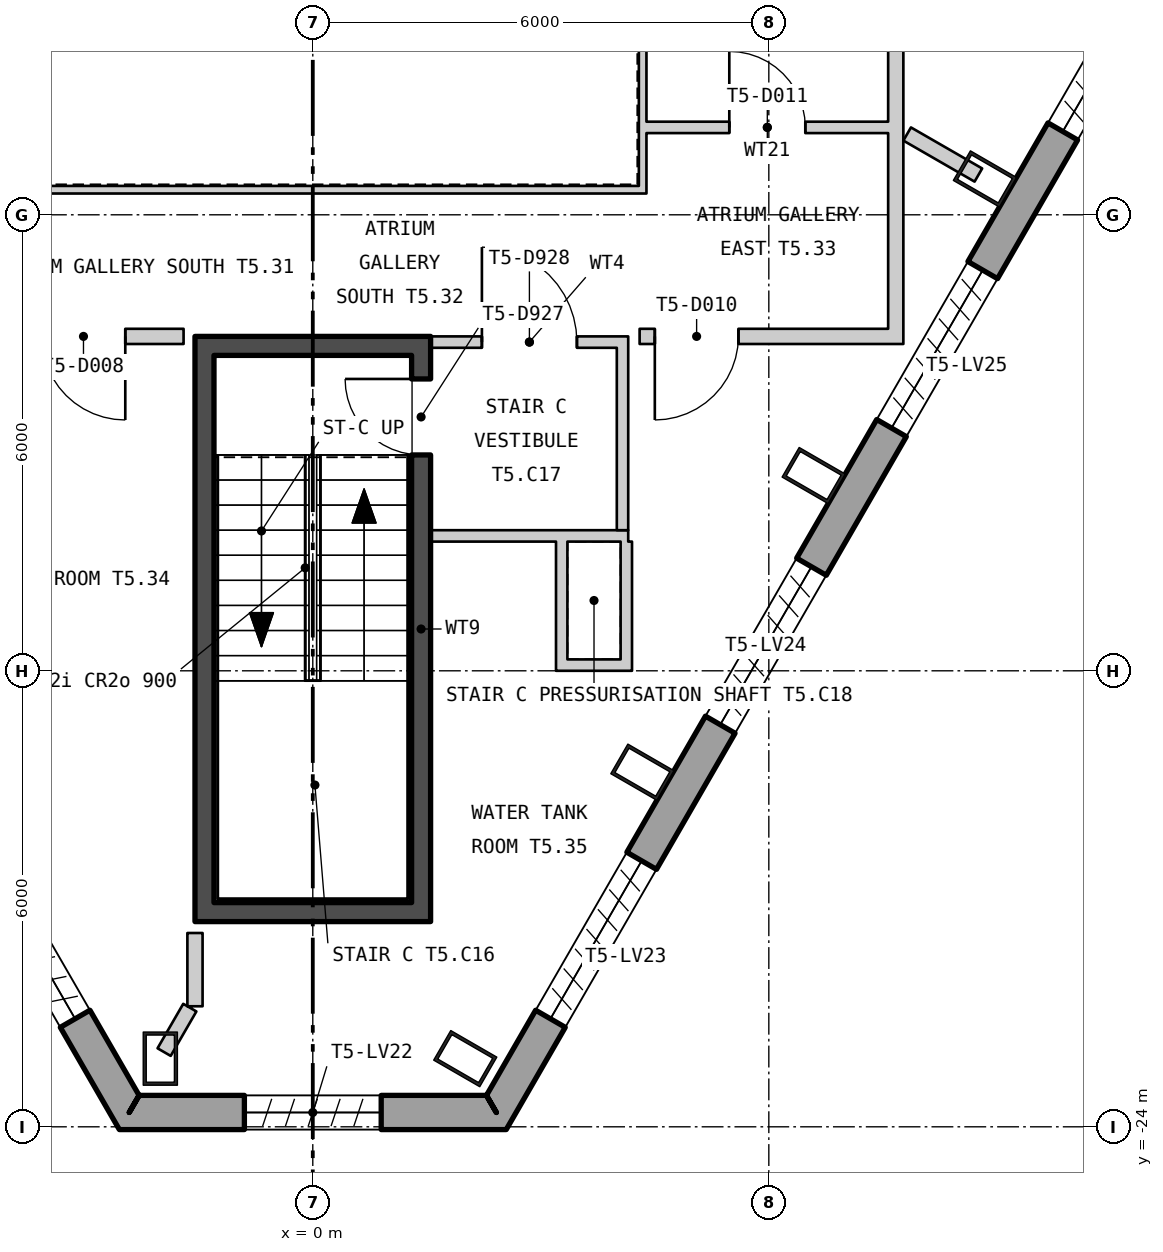
"""IFC4 building model, lengths in metres.
Left out: names, types, materials, properties, quantities, classifications, styles, units other than length and angle.
Written with IfcOpenShell. Run it as: python <this file> out.ifc"""

import sys

from ifc_helpers import new_model, si_unit, direction, frame, frame_2d, origin, origin_2d, place, context, subcontext, project, spatial, polyline, rectangle, hollow_rectangle, outline, extrude, element, fill, save


model = new_model("IFC4")
c1 = context("Model", 3, precision=1e-05, world=origin(), true_north=direction((0.0, 1.0)))
c2 = subcontext(c1, "Body", "Model", "MODEL_VIEW")
j1 = project(units=[si_unit("LENGTHUNIT", "METRE"), si_unit("PLANEANGLEUNIT", "RADIAN")], contexts=[c1])
p1 = place(None, origin())
s1 = spatial("IfcSite", under=j1, at=p1, CompositionType="ELEMENT")
p2 = place(p1, origin())
s2 = spatial("IfcBuilding", under=s1, at=p2, CompositionType="ELEMENT")
p3 = place(p2, frame((0.0, 0.0, 292.2)))
s3 = spatial("IfcBuildingStorey", under=s2, at=p3, CompositionType="ELEMENT", Elevation=292.2)
for number, where, z_axis, x_axis in (
    (1, (-2.006, -23.103, 0.0), (0.0, 0.0, 1.0), (1.0, 0.0, 0.0)),
    (2, (2.006, -23.103, 0.0), (0.0, 0.0, 1.0), (0.5, 0.866, 0.0)),
    (3, (4.336, -19.334, 0.0), (0.0, 0.0, 1.0), (0.5, 0.866, 0.0)),
    (4, (6.59, -15.431, 0.0), (0.0, 0.0, 1.0), (0.5, 0.866, 0.0)),
    (5, (8.843, -11.528, 0.0), (0.0, 0.0, 1.0), (0.5, 0.866, 0.0)),
):
    element("IfcColumn", number, at=place(p3, frame(where, z_axis=z_axis, x_axis=x_axis)), inside=s3, PredefinedType="COLUMN", context=c2, shape_type="SweptSolid", body=[
        extrude(hollow_rectangle(XDim=0.45, YDim=0.7, WallThickness=0.04, at=origin_2d()), origin(), (0.0, 0.0, 1.0), 6.0),
    ])
p4 = place(p3, frame((-25.28, 15.792, -0.18), z_axis=(0.0, 0.0, 1.0), x_axis=(0.500000141277, -0.866025322218, 0.0)))
e6 = element("IfcWall", 6, at=p4, inside=s3, PredefinedType="SOLIDWALL", context=c2, shape_type="SweptSolid", body=[
    extrude(outline(polyline([(-0.13, -0.225), (45.86, -0.225), (45.6, 0.225), (0.13, 0.225), (-0.13, -0.225)])), origin(), (0.0, 0.0, 1.0), 5.9),
])
p5 = place(p4, frame((1.424, 0.0, 1.38)))
e7 = element("IfcOpeningElement", 7, at=p5, cuts=e6, PredefinedType="OPENING", context=c2, shape_type="SweptSolid", body=[
    extrude(rectangle(XDim=2.4, YDim=3.6, at=frame_2d((1.2, 1.8))), frame((0.0, 0.235, 0.0), z_axis=(0.0, -1.0, 0.0), x_axis=(1.0, 0.0, 0.0)), (0.0, 0.0, 1.0), 0.47),
])
p6 = place(p4, frame((5.892, 0.0, 1.38)))
e8 = element("IfcOpeningElement", 8, at=p6, cuts=e6, PredefinedType="OPENING", context=c2, shape_type="SweptSolid", body=[
    extrude(rectangle(XDim=2.4, YDim=3.6, at=frame_2d((1.2, 1.8))), frame((0.0, 0.235, 0.0), z_axis=(0.0, -1.0, 0.0), x_axis=(1.0, 0.0, 0.0)), (0.0, 0.0, 1.0), 0.47),
])
p7 = place(p4, frame((10.399, 0.0, 1.38)))
e9 = element("IfcOpeningElement", 9, at=p7, cuts=e6, PredefinedType="OPENING", context=c2, shape_type="SweptSolid", body=[
    extrude(rectangle(XDim=2.4, YDim=3.6, at=frame_2d((1.2, 1.8))), frame((0.0, 0.235, 0.0), z_axis=(0.0, -1.0, 0.0), x_axis=(1.0, 0.0, 0.0)), (0.0, 0.0, 1.0), 0.47),
])
p8 = place(p4, frame((14.905, 0.0, 1.38)))
e10 = element("IfcOpeningElement", 10, at=p8, cuts=e6, PredefinedType="OPENING", context=c2, shape_type="SweptSolid", body=[
    extrude(rectangle(XDim=2.4, YDim=3.6, at=frame_2d((1.2, 1.8))), frame((0.0, 0.235, 0.0), z_axis=(0.0, -1.0, 0.0), x_axis=(1.0, 0.0, 0.0)), (0.0, 0.0, 1.0), 0.47),
])
p9 = place(p4, frame((19.412, 0.0, 1.38)))
e11 = element("IfcOpeningElement", 11, at=p9, cuts=e6, PredefinedType="OPENING", context=c2, shape_type="SweptSolid", body=[
    extrude(rectangle(XDim=2.4, YDim=3.6, at=frame_2d((1.2, 1.8))), frame((0.0, 0.235, 0.0), z_axis=(0.0, -1.0, 0.0), x_axis=(1.0, 0.0, 0.0)), (0.0, 0.0, 1.0), 0.47),
])
p10 = place(p4, frame((23.918, 0.0, 1.38)))
e12 = element("IfcOpeningElement", 12, at=p10, cuts=e6, PredefinedType="OPENING", context=c2, shape_type="SweptSolid", body=[
    extrude(rectangle(XDim=2.4, YDim=3.6, at=frame_2d((1.2, 1.8))), frame((0.0, 0.235, 0.0), z_axis=(0.0, -1.0, 0.0), x_axis=(1.0, 0.0, 0.0)), (0.0, 0.0, 1.0), 0.47),
])
p11 = place(p4, frame((28.425, 0.0, 1.38)))
e13 = element("IfcOpeningElement", 13, at=p11, cuts=e6, PredefinedType="OPENING", context=c2, shape_type="SweptSolid", body=[
    extrude(rectangle(XDim=2.4, YDim=3.6, at=frame_2d((1.2, 1.8))), frame((0.0, 0.235, 0.0), z_axis=(0.0, -1.0, 0.0), x_axis=(1.0, 0.0, 0.0)), (0.0, 0.0, 1.0), 0.47),
])
p12 = place(p4, frame((32.932, 0.0, 1.38)))
e14 = element("IfcOpeningElement", 14, at=p12, cuts=e6, PredefinedType="OPENING", context=c2, shape_type="SweptSolid", body=[
    extrude(rectangle(XDim=2.4, YDim=3.6, at=frame_2d((1.2, 1.8))), frame((0.0, 0.235, 0.0), z_axis=(0.0, -1.0, 0.0), x_axis=(1.0, 0.0, 0.0)), (0.0, 0.0, 1.0), 0.47),
])
p13 = place(p4, frame((37.438, 0.0, 1.38)))
e15 = element("IfcOpeningElement", 15, at=p13, cuts=e6, PredefinedType="OPENING", context=c2, shape_type="SweptSolid", body=[
    extrude(rectangle(XDim=2.4, YDim=3.6, at=frame_2d((1.2, 1.8))), frame((0.0, 0.235, 0.0), z_axis=(0.0, -1.0, 0.0), x_axis=(1.0, 0.0, 0.0)), (0.0, 0.0, 1.0), 0.47),
])
p14 = place(p4, frame((41.907, 0.0, 1.38)))
e16 = element("IfcOpeningElement", 16, at=p14, cuts=e6, PredefinedType="OPENING", context=c2, shape_type="SweptSolid", body=[
    extrude(rectangle(XDim=2.4, YDim=3.6, at=frame_2d((1.2, 1.8))), frame((0.0, 0.235, 0.0), z_axis=(0.0, -1.0, 0.0), x_axis=(1.0, 0.0, 0.0)), (0.0, 0.0, 1.0), 0.47),
])
p15 = place(p3, frame((-2.415, -23.812, -0.18), z_axis=(0.0, 0.0, 1.0), x_axis=(1.0, 0.0, 0.0)))
e17 = element("IfcWall", 17, at=p15, inside=s3, PredefinedType="SOLIDWALL", context=c2, shape_type="SweptSolid", body=[
    extrude(outline(polyline([(-0.13, -0.225), (4.96, -0.225), (4.7, 0.225), (0.13, 0.225), (-0.13, -0.225)])), origin(), (0.0, 0.0, 1.0), 5.9),
])
p16 = place(p15, frame((1.515, 0.0, 1.38)))
e18 = element("IfcOpeningElement", 18, at=p16, cuts=e17, PredefinedType="OPENING", context=c2, shape_type="SweptSolid", body=[
    extrude(rectangle(XDim=1.8, YDim=3.6, at=frame_2d((0.9, 1.8))), frame((0.0, 0.235, 0.0), z_axis=(0.0, -1.0, 0.0), x_axis=(1.0, 0.0, 0.0)), (0.0, 0.0, 1.0), 0.47),
])
p17 = place(p3, frame((2.415, -23.812, -0.18), z_axis=(0.0, 0.0, 1.0), x_axis=(0.499998326906, 0.866026369744, 0.0)))
e19 = element("IfcWall", 19, at=p17, inside=s3, PredefinedType="SOLIDWALL", context=c2, shape_type="SweptSolid", body=[
    extrude(outline(polyline([(-0.13, -0.225), (17.959, -0.225), (17.959, 0.225), (0.13, 0.225), (-0.13, -0.225)])), origin(), (0.0, 0.0, 1.0), 5.9),
])
p18 = place(p17, frame((1.424, 0.0, 1.38)))
e20 = element("IfcOpeningElement", 20, at=p18, cuts=e19, PredefinedType="OPENING", context=c2, shape_type="SweptSolid", body=[
    extrude(rectangle(XDim=2.4, YDim=3.6, at=frame_2d((1.2, 1.8))), frame((0.0, 0.235, 0.0), z_axis=(0.0, -1.0, 0.0), x_axis=(1.0, 0.0, 0.0)), (0.0, 0.0, 1.0), 0.47),
])
p19 = place(p17, frame((5.892, 0.0, 1.38)))
e21 = element("IfcOpeningElement", 21, at=p19, cuts=e19, PredefinedType="OPENING", context=c2, shape_type="SweptSolid", body=[
    extrude(rectangle(XDim=2.4, YDim=3.6, at=frame_2d((1.2, 1.8))), frame((0.0, 0.235, 0.0), z_axis=(0.0, -1.0, 0.0), x_axis=(1.0, 0.0, 0.0)), (0.0, 0.0, 1.0), 0.47),
])
p20 = place(p17, frame((10.399, 0.0, 1.38)))
e22 = element("IfcOpeningElement", 22, at=p20, cuts=e19, PredefinedType="OPENING", context=c2, shape_type="SweptSolid", body=[
    extrude(rectangle(XDim=2.4, YDim=3.6, at=frame_2d((1.2, 1.8))), frame((0.0, 0.235, 0.0), z_axis=(0.0, -1.0, 0.0), x_axis=(1.0, 0.0, 0.0)), (0.0, 0.0, 1.0), 0.47),
])
p21 = place(p17, frame((14.905, 0.0, 1.38)))
e23 = element("IfcOpeningElement", 23, at=p21, cuts=e19, PredefinedType="OPENING", context=c2, shape_type="SweptSolid", body=[
    extrude(rectangle(XDim=2.4, YDim=3.6, at=frame_2d((1.2, 1.8))), frame((0.0, 0.235, 0.0), z_axis=(0.0, -1.0, 0.0), x_axis=(1.0, 0.0, 0.0)), (0.0, 0.0, 1.0), 0.47),
])
p22 = place(p3, frame((-4.39, -11.67, 0.0), z_axis=(0.0, 0.0, 1.0), x_axis=(1.0, 0.0, 0.0)))
e24 = element("IfcWall", 24, at=p22, inside=s3, PredefinedType="PARTITIONING", context=c2, shape_type="SweptSolid", body=[
    extrude(rectangle(XDim=8.78, YDim=0.1, at=frame_2d((4.39, 0.0))), origin(), (0.0, 0.0, 1.0), 5.7),
])
p23 = place(p3, frame((4.34, -11.62, 0.0), z_axis=(0.0, 0.0, 1.0), x_axis=(0.0, 1.0, 0.0)))
e25 = element("IfcWall", 25, at=p23, inside=s3, PredefinedType="PARTITIONING", context=c2, shape_type="SweptSolid", body=[
    extrude(rectangle(XDim=8.04, YDim=0.1, at=frame_2d((4.02, 0.0))), origin(), (0.0, 0.0, 1.0), 5.7),
])
p24 = place(p3, frame((-1.425, -21.05, 0.0), z_axis=(0.0, 0.0, 1.0), x_axis=(0.0, 1.0, 0.0)))
e26 = element("IfcWall", 26, at=p24, inside=s3, PredefinedType="SHEAR", context=c2, shape_type="SweptSolid", body=[
    extrude(rectangle(XDim=7.2, YDim=0.25, at=frame_2d((3.6, 0.0))), origin(), (0.0, 0.0, 1.0), 5.7),
])
p25 = place(p3, frame((1.425, -21.05, 0.0), z_axis=(0.0, 0.0, 1.0), x_axis=(0.0, 1.0, 0.0)))
e27 = element("IfcWall", 27, at=p25, inside=s3, PredefinedType="SHEAR", context=c2, shape_type="SweptSolid", body=[
    extrude(rectangle(XDim=7.2, YDim=0.25, at=frame_2d((3.6, 0.0))), origin(), (0.0, 0.0, 1.0), 5.7),
])
p26 = place(p25, frame((5.89, 0.0, 0.0)))
e28 = element("IfcOpeningElement", 28, at=p26, cuts=e27, PredefinedType="OPENING", context=c2, shape_type="SweptSolid", body=[
    extrude(rectangle(XDim=1.0, YDim=2.1, at=frame_2d((0.5, 1.05))), frame((0.0, 0.135, 0.0), z_axis=(0.0, -1.0, 0.0), x_axis=(1.0, 0.0, 0.0)), (0.0, 0.0, 1.0), 0.27),
])
for number, where, z_axis, x_axis in (
    (29, (-1.55, -21.175, 0.0), (0.0, 0.0, 1.0), (1.0, 0.0, 0.0)),
    (30, (-1.55, -13.725, 0.0), (0.0, 0.0, 1.0), (1.0, 0.0, 0.0)),
):
    element("IfcWall", number, at=place(p3, frame(where, z_axis=z_axis, x_axis=x_axis)), inside=s3, PredefinedType="SHEAR", context=c2, shape_type="SweptSolid", body=[
        extrude(rectangle(XDim=3.1, YDim=0.25, at=frame_2d((1.55, 0.0))), origin(), (0.0, 0.0, 1.0), 5.7),
    ])
p27 = place(p3, frame((1.55, -16.225, 0.0), z_axis=(0.0, 0.0, 1.0), x_axis=(1.0, 0.0, 0.0)))
e31 = element("IfcWall", 31, at=p27, inside=s3, PredefinedType="PARTITIONING", context=c2, shape_type="SweptSolid", body=[
    extrude(rectangle(XDim=2.6, YDim=0.15, at=frame_2d((1.3, 0.0))), origin(), (0.0, 0.0, 1.0), 5.7),
])
p28 = place(p3, frame((4.075, -16.15, 0.0), z_axis=(0.0, 0.0, 1.0), x_axis=(0.0, 1.0, 0.0)))
e32 = element("IfcWall", 32, at=p28, inside=s3, PredefinedType="PARTITIONING", context=c2, shape_type="SweptSolid", body=[
    extrude(rectangle(XDim=2.4, YDim=0.15, at=frame_2d((1.2, 0.0))), origin(), (0.0, 0.0, 1.0), 5.7),
])
p29 = place(p3, frame((1.55, -13.675, 0.0), z_axis=(0.0, 0.0, 1.0), x_axis=(1.0, 0.0, 0.0)))
e33 = element("IfcWall", 33, at=p29, inside=s3, PredefinedType="PARTITIONING", context=c2, shape_type="SweptSolid", body=[
    extrude(rectangle(XDim=2.6, YDim=0.15, at=frame_2d((1.3, 0.0))), origin(), (0.0, 0.0, 1.0), 4.79),
])
p30 = place(p29, frame((0.675, 0.0, 0.0)))
e34 = element("IfcOpeningElement", 34, at=p30, cuts=e33, PredefinedType="OPENING", context=c2, shape_type="SweptSolid", body=[
    extrude(rectangle(XDim=1.25, YDim=2.1, at=frame_2d((0.625, 1.05))), frame((0.0, 0.085, 0.0), z_axis=(0.0, -1.0, 0.0), x_axis=(1.0, 0.0, 0.0)), (0.0, 0.0, 1.0), 0.17),
])
p31 = place(p3, frame((3.275, -18.0, 0.0), z_axis=(0.0, 0.0, 1.0), x_axis=(0.0, 1.0, 0.0)))
e35 = element("IfcWall", 35, at=p31, inside=s3, PredefinedType="PARTITIONING", context=c2, shape_type="SweptSolid", body=[
    extrude(rectangle(XDim=1.7, YDim=0.15, at=frame_2d((0.85, 0.0))), origin(), (0.0, 0.0, 1.0), 5.25),
])
p32 = place(p3, frame((3.35, -17.925, 0.0), z_axis=(0.0, 0.0, 1.0), x_axis=(1.0, 0.0, 0.0)))
e36 = element("IfcWall", 36, at=p32, inside=s3, PredefinedType="PARTITIONING", context=c2, shape_type="SweptSolid", body=[
    extrude(rectangle(XDim=0.7, YDim=0.15, at=frame_2d((0.35, 0.0))), origin(), (0.0, 0.0, 1.0), 5.7),
])
p33 = place(p3, frame((4.125, -18.0, 0.0), z_axis=(0.0, 0.0, 1.0), x_axis=(0.0, 1.0, 0.0)))
e37 = element("IfcWall", 37, at=p33, inside=s3, PredefinedType="PARTITIONING", context=c2, shape_type="SweptSolid", body=[
    extrude(rectangle(XDim=1.7, YDim=0.15, at=frame_2d((0.85, 0.0))), origin(), (0.0, 0.0, 1.0), 5.7),
])
p34 = place(p3, frame((-7.57, -13.6, 0.0), z_axis=(0.0, 0.0, 1.0), x_axis=(1.0, 0.0, 0.0)))
e38 = element("IfcWall", 38, at=p34, inside=s3, PredefinedType="PARTITIONING", context=c2, shape_type="SweptSolid", body=[
    extrude(rectangle(XDim=5.87, YDim=0.2, at=frame_2d((2.935, 0.0))), origin(), (0.0, 0.0, 1.0), 4.79),
])
p35 = place(p34, frame((4.003, 0.0, 0.0)))
e39 = element("IfcOpeningElement", 39, at=p35, cuts=e38, PredefinedType="OPENING", context=c2, shape_type="SweptSolid", body=[
    extrude(rectangle(XDim=1.1, YDim=2.1, at=frame_2d((0.55, 1.05))), frame((0.0, 0.11, 0.0), z_axis=(0.0, -1.0, 0.0), x_axis=(1.0, 0.0, 0.0)), (0.0, 0.0, 1.0), 0.22),
])
p36 = place(p3, frame((-1.956, -23.017, 0.0), z_axis=(0.0, 0.0, 1.0), x_axis=(0.500277597875, 0.865865073245, 0.0)))
e40 = element("IfcWall", 40, at=p36, inside=s3, PredefinedType="PARTITIONING", context=c2, shape_type="SweptSolid", body=[
    extrude(rectangle(XDim=0.676, YDim=0.2, at=frame_2d((0.338, 0.0))), origin(), (0.0, 0.0, 1.0), 5.7),
])
p37 = place(p3, frame((-1.55, -22.414, 0.0), z_axis=(0.0, 0.0, 1.0), x_axis=(0.0, 1.0, 0.0)))
e41 = element("IfcWall", 41, at=p37, inside=s3, PredefinedType="PARTITIONING", context=c2, shape_type="SweptSolid", body=[
    extrude(rectangle(XDim=0.964, YDim=0.2, at=frame_2d((0.482, 0.0))), origin(), (0.0, 0.0, 1.0), 5.7),
])
p38 = place(p3, frame((4.3, -13.6, 0.0), z_axis=(0.0, 0.0, 1.0), x_axis=(1.0, 0.0, 0.0)))
e42 = element("IfcWall", 42, at=p38, inside=s3, PredefinedType="PARTITIONING", context=c2, shape_type="SweptSolid", body=[
    extrude(rectangle(XDim=3.27, YDim=0.2, at=frame_2d((1.635, 0.0))), origin(), (0.0, 0.0, 1.0), 4.79),
])
p39 = place(p38, frame((0.2, 0.0, 0.0)))
e43 = element("IfcOpeningElement", 43, at=p39, cuts=e42, PredefinedType="OPENING", context=c2, shape_type="SweptSolid", body=[
    extrude(rectangle(XDim=1.1, YDim=2.1, at=frame_2d((0.55, 1.05))), frame((0.0, 0.11, 0.0), z_axis=(0.0, -1.0, 0.0), x_axis=(1.0, 0.0, 0.0)), (0.0, 0.0, 1.0), 0.22),
])
p40 = place(p3, frame((4.39, -10.85, 0.0), z_axis=(0.0, 0.0, 1.0), x_axis=(1.0, 0.0, 0.0)))
e44 = element("IfcWall", 44, at=p40, inside=s3, PredefinedType="PARTITIONING", context=c2, shape_type="SweptSolid", body=[
    extrude(rectangle(XDim=3.18, YDim=0.15, at=frame_2d((1.59, 0.0))), origin(), (0.0, 0.0, 1.0), 5.7),
])
p41 = place(p40, frame((1.09, 0.0, 0.0)))
e45 = element("IfcOpeningElement", 45, at=p41, cuts=e44, PredefinedType="OPENING", context=c2, shape_type="SweptSolid", body=[
    extrude(rectangle(XDim=1.0, YDim=2.1, at=frame_2d((0.5, 1.05))), frame((0.0, 0.085, 0.0), z_axis=(0.0, -1.0, 0.0), x_axis=(1.0, 0.0, 0.0)), (0.0, 0.0, 1.0), 0.17),
])
p42 = place(p3, frame((7.67, -13.7, 0.0), z_axis=(0.0, 0.0, 1.0), x_axis=(0.0, 1.0, 0.0)))
e46 = element("IfcWall", 46, at=p42, inside=s3, PredefinedType="PARTITIONING", context=c2, shape_type="SweptSolid", body=[
    extrude(rectangle(XDim=15.912, YDim=0.2, at=frame_2d((7.956, 0.0))), origin(), (0.0, 0.0, 1.0), 5.7),
])
p43 = place(p42, frame((5.342, 0.0, 0.0)))
e47 = element("IfcOpeningElement", 47, at=p43, cuts=e46, PredefinedType="OPENING", context=c2, shape_type="SweptSolid", body=[
    extrude(rectangle(XDim=1.1, YDim=2.1, at=frame_2d((0.55, 1.05))), frame((0.0, 0.11, 0.0), z_axis=(0.0, -1.0, 0.0), x_axis=(1.0, 0.0, 0.0)), (0.0, 0.0, 1.0), 0.22),
])
p44 = place(p3, frame((7.82, -10.937, 0.0), z_axis=(0.0, 0.0, 1.0), x_axis=(0.866416404672, -0.49932215424, 0.0)))
e48 = element("IfcWall", 48, at=p44, inside=s3, PredefinedType="PARTITIONING", context=c2, shape_type="SweptSolid", body=[
    extrude(rectangle(XDim=1.081, YDim=0.2, at=frame_2d((0.541, 0.0))), origin(), (0.0, 0.0, 1.0), 5.7),
])
p45 = place(p26, origin())
e49 = element("IfcDoor", 49, at=p45, inside=s3, OperationType="SINGLE_SWING_LEFT", PredefinedType="DOOR", context=c2, shape_type="SweptSolid", body=[
    extrude(rectangle(XDim=1.0, YDim=2.1, at=frame_2d((0.5, 1.05))), frame((0.0, 0.025, 0.0), z_axis=(0.0, -1.0, 0.0), x_axis=(1.0, 0.0, 0.0)), (0.0, 0.0, 1.0), 0.05),
])
fill(e28, e49)
p46 = place(p30, origin())
e50 = element("IfcDoor", 50, at=p46, inside=s3, OperationType="SINGLE_SWING_RIGHT", PredefinedType="DOOR", context=c2, shape_type="SweptSolid", body=[
    extrude(rectangle(XDim=1.25, YDim=2.1, at=frame_2d((0.625, 1.05))), frame((0.0, 0.025, 0.0), z_axis=(0.0, -1.0, 0.0), x_axis=(1.0, 0.0, 0.0)), (0.0, 0.0, 1.0), 0.05),
])
fill(e34, e50)
p47 = place(p35, origin())
e51 = element("IfcDoor", 51, at=p47, inside=s3, OperationType="SINGLE_SWING_RIGHT", PredefinedType="DOOR", context=c2, shape_type="SweptSolid", body=[
    extrude(rectangle(XDim=1.1, YDim=2.1, at=frame_2d((0.55, 1.05))), frame((0.0, 0.025, 0.0), z_axis=(0.0, -1.0, 0.0), x_axis=(1.0, 0.0, 0.0)), (0.0, 0.0, 1.0), 0.05),
])
fill(e39, e51)
p48 = place(p39, origin())
e52 = element("IfcDoor", 52, at=p48, inside=s3, OperationType="SINGLE_SWING_LEFT", PredefinedType="DOOR", context=c2, shape_type="SweptSolid", body=[
    extrude(rectangle(XDim=1.1, YDim=2.1, at=frame_2d((0.55, 1.05))), frame((0.0, 0.025, 0.0), z_axis=(0.0, -1.0, 0.0), x_axis=(1.0, 0.0, 0.0)), (0.0, 0.0, 1.0), 0.05),
])
fill(e43, e52)
p49 = place(p41, origin())
e53 = element("IfcDoor", 53, at=p49, inside=s3, OperationType="SINGLE_SWING_RIGHT", PredefinedType="DOOR", context=c2, shape_type="SweptSolid", body=[
    extrude(rectangle(XDim=1.0, YDim=2.1, at=frame_2d((0.5, 1.05))), frame((0.0, 0.025, 0.0), z_axis=(0.0, -1.0, 0.0), x_axis=(1.0, 0.0, 0.0)), (0.0, 0.0, 1.0), 0.05),
])
fill(e45, e53)
save(model, sys.argv[1])
